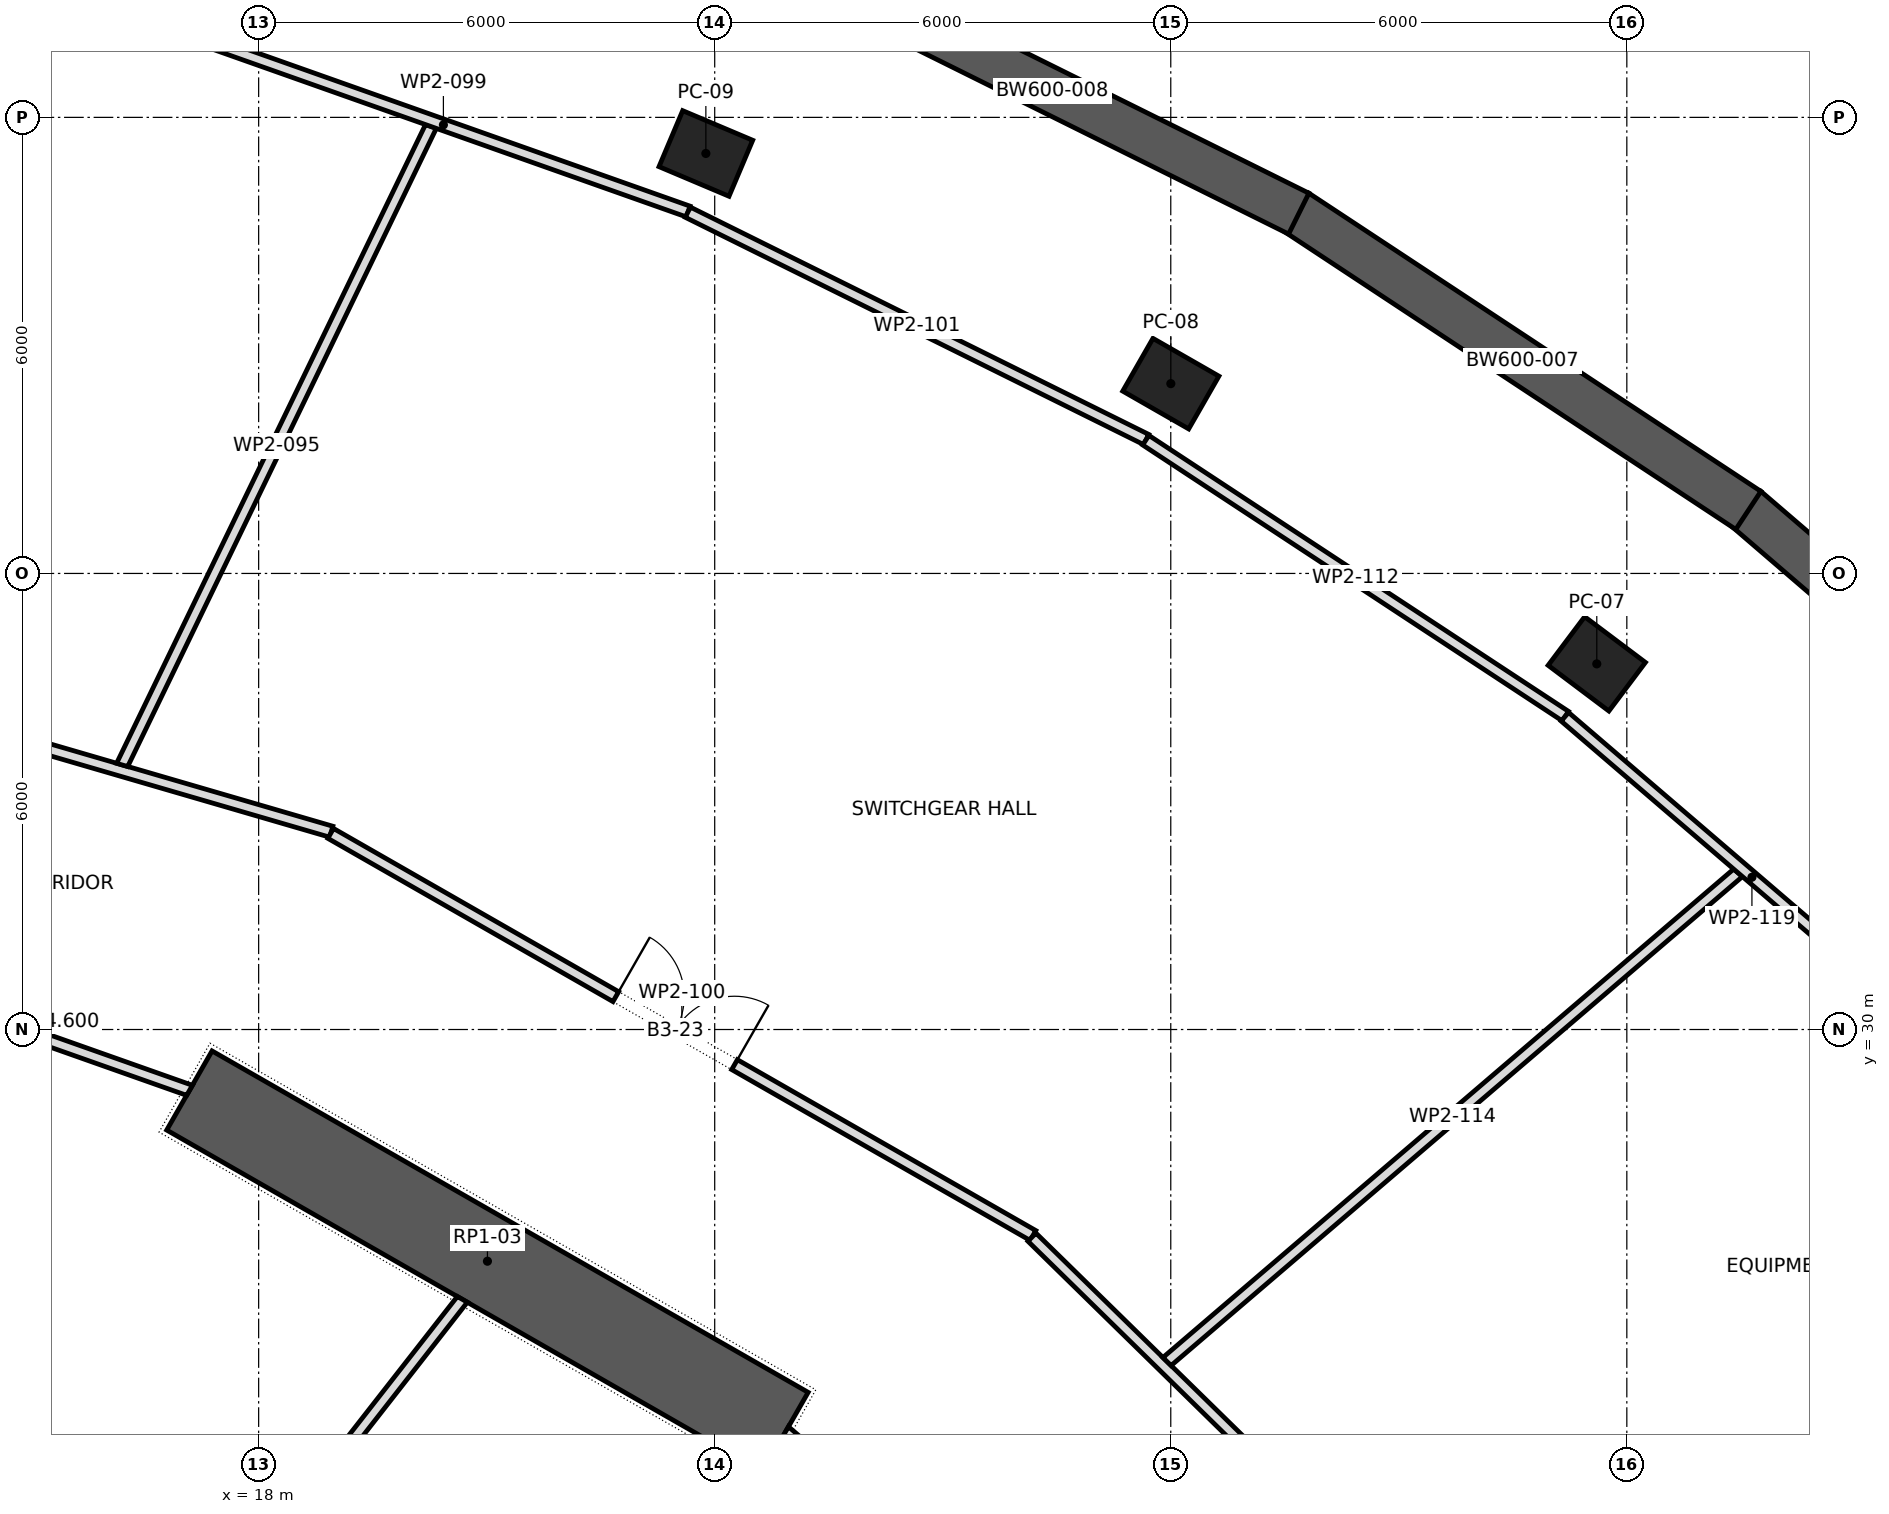
"""IFC4 building model, lengths in metres.
Left out: names, types, materials, properties, quantities, classifications, styles, units other than length and angle.
Written with IfcOpenShell. Run it as: python <this file> out.ifc"""

import sys

from ifc_helpers import new_model, si_unit, direction, frame, frame_2d, origin, origin_2d, place, context, subcontext, project, spatial, polyline, rectangle, outline, extrude, element, fill, save


model = new_model("IFC4")
c1 = context("Model", 3, precision=1e-05, world=origin(), true_north=direction((0.0, 1.0)))
c2 = subcontext(c1, "Body", "Model", "MODEL_VIEW")
j1 = project(units=[si_unit("LENGTHUNIT", "METRE"), si_unit("PLANEANGLEUNIT", "RADIAN")], contexts=[c1])
p1 = place(None, origin())
s1 = spatial("IfcSite", under=j1, at=p1, CompositionType="ELEMENT")
p2 = place(p1, origin())
s2 = spatial("IfcBuilding", under=s1, at=p2, CompositionType="ELEMENT")
p3 = place(p2, frame((0.0, 0.0, -15.0)))
s3 = spatial("IfcBuildingStorey", under=s2, at=p3, CompositionType="ELEMENT", Elevation=-15.0)
for number, where, z_axis, x_axis in (
    (1, (35.605, 34.81, -0.4), (0.0, 0.0, 1.0), (-0.799, 0.601, 0.0)),
    (2, (30.001, 38.497, -0.4), (0.0, 0.0, 1.0), (-0.868, 0.497, 0.0)),
    (3, (23.884, 41.525, -0.4), (0.0, 0.0, 1.0), (-0.921, 0.389, 0.0)),
):
    element("IfcColumn", number, at=place(p3, frame(where, z_axis=z_axis, x_axis=x_axis)), inside=s3, PredefinedType="COLUMN", context=c2, shape_type="SweptSolid", body=[
        extrude(rectangle(XDim=1.0, YDim=0.8, at=origin_2d()), origin(), (0.0, 0.0, 1.0), 5.9),
    ])
p4 = place(p3, frame((24.931, 24.706, -0.4), z_axis=(0.0, 0.0, 1.0), x_axis=(-0.867760656864, 0.496982336103, 0.0)))
e4 = element("IfcWall", 4, at=p4, inside=s3, PredefinedType="SHEAR", context=c2, shape_type="SweptSolid", body=[
    extrude(rectangle(XDim=9.038, YDim=1.2, at=frame_2d((4.519, 0.0))), origin(), (0.0, 0.0, 1.0), 5.9),
])
p5 = place(p3, frame((42.87, 32.295, -0.4), z_axis=(0.0, 0.0, 1.0), x_axis=(-0.758319142722, 0.65188348482, 0.0)))
e5 = element("IfcWall", 5, at=p5, inside=s3, PredefinedType="SOLIDWALL", context=c2, shape_type="SweptSolid", body=[
    extrude(rectangle(XDim=6.991, YDim=0.6, at=frame_2d((3.496, 0.0))), origin(), (0.0, 0.0, 1.0), 5.9),
])
p6 = place(p3, frame((37.599, 36.83, -0.4), z_axis=(0.0, 0.0, 1.0), x_axis=(-0.834745196239, 0.550636411215, 0.0)))
e6 = element("IfcWall", 6, at=p6, inside=s3, PredefinedType="SOLIDWALL", context=c2, shape_type="SweptSolid", body=[
    extrude(rectangle(XDim=7.124, YDim=0.6, at=frame_2d((3.562, 0.0))), origin(), (0.0, 0.0, 1.0), 5.9),
])
p7 = place(p3, frame((31.684, 40.734, -0.4), z_axis=(0.0, 0.0, 1.0), x_axis=(-0.895750986496, 0.44455614965, 0.0)))
e7 = element("IfcWall", 7, at=p7, inside=s3, PredefinedType="SOLIDWALL", context=c2, shape_type="SweptSolid", body=[
    extrude(rectangle(XDim=7.245, YDim=0.6, at=frame_2d((3.623, 0.0))), origin(), (0.0, 0.0, 1.0), 5.9),
])
p8 = place(p3, frame((8.416, 35.672, 0.0), z_axis=(0.0, 0.0, 1.0), x_axis=(0.960099578905, -0.279658360479, 0.0)))
e8 = element("IfcWall", 8, at=p8, inside=s3, PredefinedType="PARTITIONING", context=c2, shape_type="SweptSolid", body=[
    extrude(rectangle(XDim=10.977, YDim=0.15, at=frame_2d((5.489, 0.0))), origin(), (0.0, 0.0, 1.0), 5.15),
])
p9 = place(p3, frame((11.788, 15.074, 0.0), z_axis=(0.0, 0.0, 1.0), x_axis=(0.615848120598, 0.787864894735, 0.0)))
e9 = element("IfcWall", 9, at=p9, inside=s3, PredefinedType="PARTITIONING", context=c2, shape_type="SweptSolid", body=[
    extrude(outline(polyline([(0.0, -0.075), (14.449, -0.075), (14.428, 0.075), (0.0, 0.075), (0.0, -0.075)])), origin(), (0.0, 0.0, 1.0), 5.15),
])
p10 = place(p3, frame((16.204, 33.481, 0.0), z_axis=(0.0, 0.0, 1.0), x_axis=(0.435389941519, 0.90024196682, 0.0)))
e10 = element("IfcWall", 10, at=p10, inside=s3, PredefinedType="PARTITIONING", context=c2, shape_type="SweptSolid", body=[
    extrude(outline(polyline([(0.013, -0.075), (9.339, -0.075), (9.323, 0.075), (-0.013, 0.075), (0.013, -0.075)])), origin(), (0.0, 0.0, 1.0), 5.15),
])
p11 = place(p3, frame((17.091, 29.2, 0.0), z_axis=(0.0, 0.0, 1.0), x_axis=(-0.942814385805, 0.333318217204, 0.0)))
e11 = element("IfcWall", 11, at=p11, inside=s3, PredefinedType="PARTITIONING", context=c2, shape_type="SweptSolid", body=[
    extrude(outline(polyline([(-0.014, -0.075), (5.448, -0.075), (5.422, 0.075), (0.014, 0.075), (-0.014, -0.075)])), origin(), (0.0, 0.0, 1.0), 4.6),
])
p12 = place(p3, frame((17.211, 43.042, 0.0), z_axis=(0.0, 0.0, 1.0), x_axis=(0.94266330093, -0.333745263757, 0.0)))
e12 = element("IfcWall", 12, at=p12, inside=s3, PredefinedType="PARTITIONING", context=c2, shape_type="SweptSolid", body=[
    extrude(rectangle(XDim=6.832, YDim=0.15, at=frame_2d((3.416, 0.0))), origin(), (0.0, 0.0, 1.0), 5.15),
])
p13 = place(p3, frame((18.948, 32.58, 0.0), z_axis=(0.0, 0.0, 1.0), x_axis=(0.867835024459, -0.496852463336, 0.0)))
e13 = element("IfcWall", 13, at=p13, inside=s3, PredefinedType="PARTITIONING", context=c2, shape_type="SweptSolid", body=[
    extrude(rectangle(XDim=10.647, YDim=0.15, at=frame_2d((5.323, 0.0))), origin(), (0.0, 0.0, 1.0), 5.15),
])
p14 = place(p13, frame((4.323, 0.0, 0.0)))
e14 = element("IfcOpeningElement", 14, at=p14, cuts=e13, PredefinedType="OPENING", context=c2, shape_type="SweptSolid", body=[
    extrude(rectangle(XDim=1.8, YDim=2.1, at=frame_2d((0.9, 1.05))), frame((0.0, 0.087, 0.0), z_axis=(0.0, -1.0, 0.0), x_axis=(1.0, 0.0, 0.0)), (0.0, 0.0, 1.0), 0.174),
])
p15 = place(p3, frame((23.646, 40.752, 0.0), z_axis=(0.0, 0.0, 1.0), x_axis=(0.895909442692, -0.444236727991, 0.0)))
e15 = element("IfcWall", 15, at=p15, inside=s3, PredefinedType="PARTITIONING", context=c2, shape_type="SweptSolid", body=[
    extrude(rectangle(XDim=6.731, YDim=0.15, at=frame_2d((3.365, 0.0))), origin(), (0.0, 0.0, 1.0), 5.15),
])
p16 = place(p3, frame((28.174, 27.268, 0.0), z_axis=(0.0, 0.0, 1.0), x_axis=(0.714427427428, -0.699709547554, 0.0)))
e16 = element("IfcWall", 16, at=p16, inside=s3, PredefinedType="PARTITIONING", context=c2, shape_type="SweptSolid", body=[
    extrude(rectangle(XDim=10.202, YDim=0.15, at=frame_2d((5.101, 0.0))), origin(), (0.0, 0.0, 1.0), 5.15),
])
p17 = place(p16, frame((5.74, 0.0, 0.0)))
e17 = element("IfcOpeningElement", 17, at=p17, cuts=e16, PredefinedType="OPENING", context=c2, shape_type="SweptSolid", body=[
    extrude(rectangle(XDim=1.0, YDim=2.1, at=frame_2d((0.5, 1.05))), frame((0.0, 0.087, 0.0), z_axis=(0.0, -1.0, 0.0), x_axis=(1.0, 0.0, 0.0)), (0.0, 0.0, 1.0), 0.174),
])
p18 = place(p3, frame((28.789, 21.411, 0.0), z_axis=(0.0, 0.0, 1.0), x_axis=(-0.760084552743, 0.649824185978, 0.0)))
e18 = element("IfcWall", 18, at=p18, inside=s3, PredefinedType="PARTITIONING", context=c2, shape_type="SweptSolid", body=[
    extrude(outline(polyline([(-0.015, -0.075), (5.089, -0.075), (5.061, 0.075), (0.015, 0.075), (-0.015, -0.075)])), origin(), (0.0, 0.0, 1.0), 4.6),
])
p19 = place(p3, frame((29.671, 37.753, 0.0), z_axis=(0.0, 0.0, 1.0), x_axis=(0.83553583791, -0.549435950378, 0.0)))
e19 = element("IfcWall", 19, at=p19, inside=s3, PredefinedType="PARTITIONING", context=c2, shape_type="SweptSolid", body=[
    extrude(rectangle(XDim=6.606, YDim=0.15, at=frame_2d((3.303, 0.0))), origin(), (0.0, 0.0, 1.0), 5.15),
])
p20 = place(p3, frame((29.95, 25.632, 0.0), z_axis=(0.0, 0.0, 1.0), x_axis=(0.759739094859, 0.650228042876, 0.0)))
e20 = element("IfcWall", 20, at=p20, inside=s3, PredefinedType="PARTITIONING", context=c2, shape_type="SweptSolid", body=[
    extrude(outline(polyline([(0.007, -0.075), (9.901, -0.075), (9.878, 0.075), (-0.007, 0.075), (0.007, -0.075)])), origin(), (0.0, 0.0, 1.0), 5.15),
])
p21 = place(p3, frame((35.185, 34.114, 0.0), z_axis=(0.0, 0.0, 1.0), x_axis=(0.759033312601, -0.651051787773, 0.0)))
e21 = element("IfcWall", 21, at=p21, inside=s3, PredefinedType="PARTITIONING", context=c2, shape_type="SweptSolid", body=[
    extrude(rectangle(XDim=6.484, YDim=0.15, at=frame_2d((3.242, 0.0))), origin(), (0.0, 0.0, 1.0), 5.15),
])
p22 = place(p14, origin())
e22 = element("IfcDoor", 22, at=p22, inside=s3, OperationType="DOUBLE_DOOR_SINGLE_SWING", PredefinedType="DOOR", context=c2, shape_type="SweptSolid", body=[
    extrude(rectangle(XDim=1.8, YDim=2.1, at=frame_2d((0.9, 1.05))), frame((0.0, 0.025, 0.0), z_axis=(0.0, -1.0, 0.0), x_axis=(1.0, 0.0, 0.0)), (0.0, 0.0, 1.0), 0.05),
])
fill(e14, e22)
save(model, sys.argv[1])
